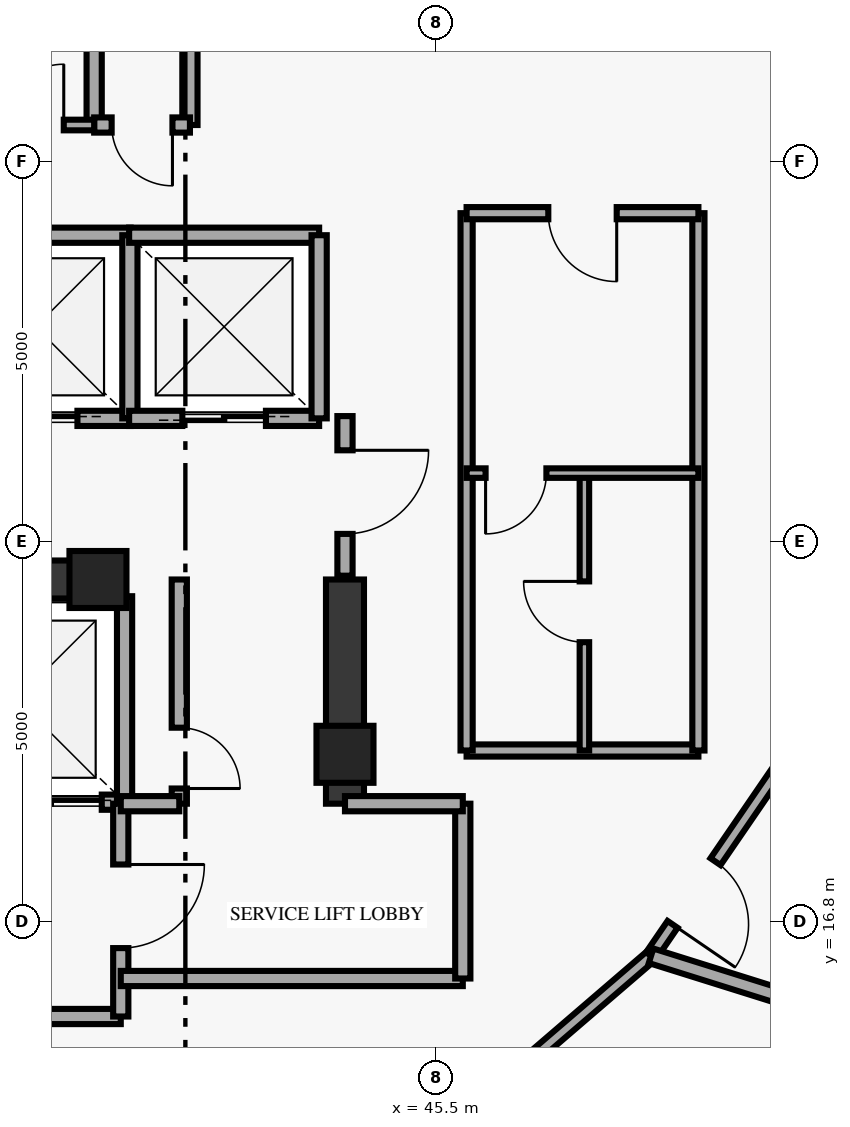
"""IFC4 building model, lengths in metres.
Left out: names, types, materials, properties, quantities, classifications, styles, units other than length and angle.
Written with IfcOpenShell. Run it as: python <this file> out.ifc"""

import sys

from ifc_helpers import new_model, si_unit, direction, frame, frame_2d, origin, origin_2d, place, context, subcontext, project, spatial, rectangle, extrude, element, fill, save


model = new_model("IFC4")
c1 = context("Model", 3, precision=1e-05, world=origin(), true_north=direction((0.0, 1.0)))
c2 = subcontext(c1, "Body", "Model", "MODEL_VIEW")
j1 = project(units=[si_unit("LENGTHUNIT", "METRE"), si_unit("PLANEANGLEUNIT", "RADIAN")], contexts=[c1])
p1 = place(None, origin())
s1 = spatial("IfcSite", under=j1, at=p1, CompositionType="ELEMENT")
p2 = place(p1, origin())
s2 = spatial("IfcBuilding", under=s1, at=p2, CompositionType="ELEMENT")
p3 = place(p2, frame((0.0, 0.0, 297.4)))
s3 = spatial("IfcBuildingStorey", under=s2, at=p3, CompositionType="ELEMENT", Elevation=297.4)
for number, where, z_axis, x_axis in (
    (1, (41.05, 21.3, 0.0), (0.0, 0.0, 1.0), (1.0, 0.0, 0.0)),
    (2, (44.3, 19.0, 0.0), (0.0, 0.0, 1.0), (1.0, 0.0, 0.0)),
):
    element("IfcColumn", number, at=place(p3, frame(where, z_axis=z_axis, x_axis=x_axis)), inside=s3, PredefinedType="PILASTER", context=c2, shape_type="SweptSolid", body=[
        extrude(rectangle(XDim=0.75, YDim=0.75, at=origin_2d()), origin(), (0.0, 0.0, 1.0), 3.45),
    ])
p4 = place(p3, frame((44.3, 18.35, 0.0), z_axis=(0.0, 0.0, 1.0), x_axis=(0.0, 1.0, 0.0)))
e3 = element("IfcWall", 3, at=p4, inside=s3, PredefinedType="SHEAR", context=c2, shape_type="SweptSolid", body=[
    extrude(rectangle(XDim=2.95, YDim=0.5, at=frame_2d((1.475, 0.0))), origin(), (0.0, 0.0, 1.0), 3.45),
])
p5 = place(p3, frame((33.7, 21.3, 0.0), z_axis=(0.0, 0.0, 1.0), x_axis=(1.0, 0.0, 0.0)))
e4 = element("IfcWall", 4, at=p5, inside=s3, PredefinedType="SHEAR", context=c2, shape_type="SweptSolid", body=[
    extrude(rectangle(XDim=7.55, YDim=0.5, at=frame_2d((3.775, 0.0))), origin(), (0.0, 0.0, 1.0), 3.45),
])
for number, where, z_axis, x_axis in (
    (5, (41.0, 27.28, 0.0), (0.0, 0.0, 1.0), (0.0, 1.0, 0.0)),
    (6, (42.26, 27.28, 0.0), (0.0, 0.0, 1.0), (0.0, 1.0, 0.0)),
):
    element("IfcWall", number, at=place(p3, frame(where, z_axis=z_axis, x_axis=x_axis)), inside=s3, PredefinedType="SOLIDWALL", context=c2, shape_type="SweptSolid", body=[
        extrude(rectangle(XDim=1.77, YDim=0.2, at=frame_2d((0.885, 0.0))), origin(), (0.0, 0.0, 1.0), 3.45),
    ])
p6 = place(p3, frame((41.0, 27.28, 0.0), z_axis=(0.0, 0.0, 1.0), x_axis=(1.0, 0.0, 0.0)))
e7 = element("IfcWall", 7, at=p6, inside=s3, PredefinedType="SOLIDWALL", context=c2, shape_type="SweptSolid", body=[
    extrude(rectangle(XDim=1.26, YDim=0.2, at=frame_2d((0.63, 0.0))), origin(), (0.0, 0.0, 1.0), 3.45),
])
p7 = place(p6, frame((0.23, 0.0, 0.0)))
e8 = element("IfcOpeningElement", 8, at=p7, cuts=e7, PredefinedType="OPENING", context=c2, shape_type="SweptSolid", body=[
    extrude(rectangle(XDim=0.8, YDim=2.05, at=frame_2d((0.4, 1.025))), frame((0.0, 0.11, 0.0), z_axis=(0.0, -1.0, 0.0), x_axis=(1.0, 0.0, 0.0)), (0.0, 0.0, 1.0), 0.22),
])
p8 = place(p3, frame((38.98, 23.42, 0.0), z_axis=(0.0, 0.0, 1.0), x_axis=(1.0, 0.0, 0.0)))
e9 = element("IfcWall", 9, at=p8, inside=s3, PredefinedType="SOLIDWALL", context=c2, shape_type="SweptSolid", body=[
    extrude(rectangle(XDim=2.5, YDim=0.2, at=frame_2d((1.25, 0.0))), origin(), (0.0, 0.0, 1.0), 3.45),
])
p9 = place(p8, frame((0.7, 0.0, 0.0)))
e10 = element("IfcOpeningElement", 10, at=p9, cuts=e9, PredefinedType="OPENING", context=c2, shape_type="SweptSolid", body=[
    extrude(rectangle(XDim=1.1, YDim=2.15, at=frame_2d((0.55, 1.075))), frame((0.0, 0.11, 0.0), z_axis=(0.0, -1.0, 0.0), x_axis=(1.0, 0.0, 0.0)), (0.0, 0.0, 1.0), 0.22),
])
p10 = place(p3, frame((38.98, 25.83, 0.0), z_axis=(0.0, 0.0, 1.0), x_axis=(1.0, 0.0, 0.0)))
e11 = element("IfcWall", 11, at=p10, inside=s3, PredefinedType="SOLIDWALL", context=c2, shape_type="SweptSolid", body=[
    extrude(rectangle(XDim=2.5, YDim=0.2, at=frame_2d((1.25, 0.0))), origin(), (0.0, 0.0, 1.0), 3.45),
])
p11 = place(p3, frame((41.47, 23.42, 0.0), z_axis=(0.0, 0.0, 1.0), x_axis=(0.0, 1.0, 0.0)))
e12 = element("IfcWall", 12, at=p11, inside=s3, PredefinedType="SOLIDWALL", context=c2, shape_type="SweptSolid", body=[
    extrude(rectangle(XDim=2.41, YDim=0.2, at=frame_2d((1.205, 0.0))), origin(), (0.0, 0.0, 1.0), 3.45),
])
p12 = place(p3, frame((41.46, 23.42, 0.0), z_axis=(0.0, 0.0, 1.0), x_axis=(1.0, 0.0, 0.0)))
e13 = element("IfcWall", 13, at=p12, inside=s3, PredefinedType="SOLIDWALL", context=c2, shape_type="SweptSolid", body=[
    extrude(rectangle(XDim=2.5, YDim=0.2, at=frame_2d((1.25, 0.0))), origin(), (0.0, 0.0, 1.0), 3.45),
])
p13 = place(p12, frame((0.7, 0.0, 0.0)))
e14 = element("IfcOpeningElement", 14, at=p13, cuts=e13, PredefinedType="OPENING", context=c2, shape_type="SweptSolid", body=[
    extrude(rectangle(XDim=1.1, YDim=2.15, at=frame_2d((0.55, 1.075))), frame((0.0, 0.11, 0.0), z_axis=(0.0, -1.0, 0.0), x_axis=(1.0, 0.0, 0.0)), (0.0, 0.0, 1.0), 0.22),
])
p14 = place(p3, frame((41.46, 25.83, 0.0), z_axis=(0.0, 0.0, 1.0), x_axis=(1.0, 0.0, 0.0)))
e15 = element("IfcWall", 15, at=p14, inside=s3, PredefinedType="SOLIDWALL", context=c2, shape_type="SweptSolid", body=[
    extrude(rectangle(XDim=2.5, YDim=0.2, at=frame_2d((1.25, 0.0))), origin(), (0.0, 0.0, 1.0), 3.45),
])
p15 = place(p3, frame((43.96, 23.42, 0.0), z_axis=(0.0, 0.0, 1.0), x_axis=(0.0, 1.0, 0.0)))
e16 = element("IfcWall", 16, at=p15, inside=s3, PredefinedType="SOLIDWALL", context=c2, shape_type="SweptSolid", body=[
    extrude(rectangle(XDim=2.41, YDim=0.2, at=frame_2d((1.205, 0.0))), origin(), (0.0, 0.0, 1.0), 3.45),
])
p16 = place(p3, frame((38.57, 18.37, 0.0), z_axis=(0.0, 0.0, 1.0), x_axis=(1.0, 0.0, 0.0)))
e17 = element("IfcWall", 17, at=p16, inside=s3, PredefinedType="SOLIDWALL", context=c2, shape_type="SweptSolid", body=[
    extrude(rectangle(XDim=2.83, YDim=0.2, at=frame_2d((1.415, 0.0))), origin(), (0.0, 0.0, 1.0), 3.45),
])
p17 = place(p16, frame((1.18, 0.0, 0.0)))
e18 = element("IfcOpeningElement", 18, at=p17, cuts=e17, PredefinedType="OPENING", context=c2, shape_type="SweptSolid", body=[
    extrude(rectangle(XDim=1.35, YDim=2.18, at=frame_2d((0.675, 1.09))), frame((0.0, 0.11, 0.0), z_axis=(0.0, -1.0, 0.0), x_axis=(1.0, 0.0, 0.0)), (0.0, 0.0, 1.0), 0.22),
])
p18 = place(p3, frame((41.4, 18.37, 0.0), z_axis=(0.0, 0.0, 1.0), x_axis=(0.0, 1.0, 0.0)))
e19 = element("IfcWall", 19, at=p18, inside=s3, PredefinedType="SOLIDWALL", context=c2, shape_type="SweptSolid", body=[
    extrude(rectangle(XDim=2.71, YDim=0.2, at=frame_2d((1.355, 0.0))), origin(), (0.0, 0.0, 1.0), 3.45),
])
p19 = place(p3, frame((45.9, 19.05, 0.0), z_axis=(0.0, 0.0, 1.0), x_axis=(1.0, 0.0, 0.0)))
e20 = element("IfcWall", 20, at=p19, inside=s3, PredefinedType="PARTITIONING", context=c2, shape_type="SweptSolid", body=[
    extrude(rectangle(XDim=3.05, YDim=0.16, at=frame_2d((1.525, 0.0))), origin(), (0.0, 0.0, 1.0), 3.45),
])
for number, where, z_axis, x_axis in (
    (21, (48.95, 19.05, 0.0), (0.0, 0.0, 1.0), (0.0, 1.0, 0.0)),
    (22, (45.9, 19.05, 0.0), (0.0, 0.0, 1.0), (0.0, 1.0, 0.0)),
):
    element("IfcWall", number, at=place(p3, frame(where, z_axis=z_axis, x_axis=x_axis)), inside=s3, PredefinedType="PARTITIONING", context=c2, shape_type="SweptSolid", body=[
        extrude(rectangle(XDim=7.07, YDim=0.16, at=frame_2d((3.535, 0.0))), origin(), (0.0, 0.0, 1.0), 3.45),
    ])
p20 = place(p3, frame((47.45, 22.7, 0.0), z_axis=(0.0, 0.0, 1.0), x_axis=(0.0, -1.0, 0.0)))
e23 = element("IfcWall", 23, at=p20, inside=s3, PredefinedType="PARTITIONING", context=c2, shape_type="SweptSolid", body=[
    extrude(rectangle(XDim=3.65, YDim=0.125, at=frame_2d((1.825, 0.0))), origin(), (0.0, 0.0, 1.0), 3.45),
])
p21 = place(p20, frame((1.425, 0.0, 0.0)))
e24 = element("IfcOpeningElement", 24, at=p21, cuts=e23, PredefinedType="OPENING", context=c2, shape_type="SweptSolid", body=[
    extrude(rectangle(XDim=0.8, YDim=2.05, at=frame_2d((0.4, 1.025))), frame((0.0, 0.073, 0.0), z_axis=(0.0, -1.0, 0.0), x_axis=(1.0, 0.0, 0.0)), (0.0, 0.0, 1.0), 0.145),
])
p22 = place(p3, frame((48.95, 22.7, 0.0), z_axis=(0.0, 0.0, 1.0), x_axis=(-1.0, 0.0, 0.0)))
e25 = element("IfcWall", 25, at=p22, inside=s3, PredefinedType="PARTITIONING", context=c2, shape_type="SweptSolid", body=[
    extrude(rectangle(XDim=3.05, YDim=0.125, at=frame_2d((1.525, 0.0))), origin(), (0.0, 0.0, 1.0), 3.45),
])
p23 = place(p22, frame((2.0, 0.0, 0.0)))
e26 = element("IfcOpeningElement", 26, at=p23, cuts=e25, PredefinedType="OPENING", context=c2, shape_type="SweptSolid", body=[
    extrude(rectangle(XDim=0.8, YDim=2.05, at=frame_2d((0.4, 1.025))), frame((0.0, 0.073, 0.0), z_axis=(0.0, -1.0, 0.0), x_axis=(1.0, 0.0, 0.0)), (0.0, 0.0, 1.0), 0.145),
])
p24 = place(p3, frame((48.95, 26.12, 0.0), z_axis=(0.0, 0.0, 1.0), x_axis=(-1.0, 0.0, 0.0)))
e27 = element("IfcWall", 27, at=p24, inside=s3, PredefinedType="PARTITIONING", context=c2, shape_type="SweptSolid", body=[
    extrude(rectangle(XDim=3.05, YDim=0.16, at=frame_2d((1.525, 0.0))), origin(), (0.0, 0.0, 1.0), 3.45),
])
p25 = place(p24, frame((1.075, 0.0, 0.0)))
e28 = element("IfcOpeningElement", 28, at=p25, cuts=e27, PredefinedType="OPENING", context=c2, shape_type="SweptSolid", body=[
    extrude(rectangle(XDim=0.9, YDim=2.1, at=frame_2d((0.45, 1.05))), frame((0.0, 0.09, 0.0), z_axis=(0.0, -1.0, 0.0), x_axis=(1.0, 0.0, 0.0)), (0.0, 0.0, 1.0), 0.18),
])
p26 = place(p3, frame((44.3, 21.35, 0.0), z_axis=(0.0, 0.0, 1.0), x_axis=(0.0, 1.0, 0.0)))
e29 = element("IfcWall", 29, at=p26, inside=s3, PredefinedType="SOLIDWALL", context=c2, shape_type="SweptSolid", body=[
    extrude(rectangle(XDim=2.1, YDim=0.2, at=frame_2d((1.05, 0.0))), origin(), (0.0, 0.0, 1.0), 2.835),
])
p27 = place(p26, frame((0.55, 0.0, 0.0)))
e30 = element("IfcOpeningElement", 30, at=p27, cuts=e29, PredefinedType="OPENING", context=c2, shape_type="SweptSolid", body=[
    extrude(rectangle(XDim=1.1, YDim=2.15, at=frame_2d((0.55, 1.075))), frame((0.0, 0.11, 0.0), z_axis=(0.0, -1.0, 0.0), x_axis=(1.0, 0.0, 0.0)), (0.0, 0.0, 1.0), 0.22),
])
p28 = place(p3, frame((33.8, 15.55, 0.0), z_axis=(0.0, 0.0, 1.0), x_axis=(1.0, 0.0, 0.0)))
e31 = element("IfcWall", 31, at=p28, inside=s3, PredefinedType="SOLIDWALL", context=c2, shape_type="SweptSolid", body=[
    extrude(rectangle(XDim=7.55, YDim=0.2, at=frame_2d((3.775, 0.0))), origin(), (0.0, 0.0, 1.0), 3.45),
])
p29 = place(p3, frame((41.35, 15.55, 0.0), z_axis=(0.0, 0.0, 1.0), x_axis=(0.0, 1.0, 0.0)))
e32 = element("IfcWall", 32, at=p29, inside=s3, PredefinedType="SOLIDWALL", context=c2, shape_type="SweptSolid", body=[
    extrude(rectangle(XDim=2.8, YDim=0.2, at=frame_2d((1.4, 0.0))), origin(), (0.0, 0.0, 1.0), 3.45),
])
p30 = place(p29, frame((0.9, 0.0, 0.0)))
e33 = element("IfcOpeningElement", 33, at=p30, cuts=e32, PredefinedType="OPENING", context=c2, shape_type="SweptSolid", body=[
    extrude(rectangle(XDim=1.1, YDim=2.15, at=frame_2d((0.55, 1.075))), frame((0.0, 0.11, 0.0), z_axis=(0.0, -1.0, 0.0), x_axis=(1.0, 0.0, 0.0)), (0.0, 0.0, 1.0), 0.22),
])
p31 = place(p3, frame((41.35, 16.05, 0.0), z_axis=(0.0, 0.0, 1.0), x_axis=(1.0, 0.0, 0.0)))
e34 = element("IfcWall", 34, at=p31, inside=s3, PredefinedType="SOLIDWALL", context=c2, shape_type="SweptSolid", body=[
    extrude(rectangle(XDim=4.5, YDim=0.2, at=frame_2d((2.25, 0.0))), origin(), (0.0, 0.0, 1.0), 3.45),
])
p32 = place(p3, frame((45.85, 16.05, 0.0), z_axis=(0.0, 0.0, 1.0), x_axis=(0.0, 1.0, 0.0)))
e35 = element("IfcWall", 35, at=p32, inside=s3, PredefinedType="SOLIDWALL", context=c2, shape_type="SweptSolid", body=[
    extrude(rectangle(XDim=2.3, YDim=0.2, at=frame_2d((1.15, 0.0))), origin(), (0.0, 0.0, 1.0), 3.45),
])
p33 = place(p3, frame((44.3, 18.35, 0.0), z_axis=(0.0, 0.0, 1.0), x_axis=(1.0, 0.0, 0.0)))
e36 = element("IfcWall", 36, at=p33, inside=s3, PredefinedType="SOLIDWALL", context=c2, shape_type="SweptSolid", body=[
    extrude(rectangle(XDim=1.55, YDim=0.2, at=frame_2d((0.775, 0.0))), origin(), (0.0, 0.0, 1.0), 3.45),
])
p34 = place(p3, frame((42.12, 18.35, 0.0), z_axis=(0.0, 0.0, 1.0), x_axis=(0.0, 1.0, 0.0)))
e37 = element("IfcWall", 37, at=p34, inside=s3, PredefinedType="SOLIDWALL", context=c2, shape_type="SweptSolid", body=[
    extrude(rectangle(XDim=2.95, YDim=0.2, at=frame_2d((1.475, 0.0))), origin(), (0.0, 0.0, 1.0), 3.45),
])
p35 = place(p34, frame((0.2, 0.0, 0.0)))
e38 = element("IfcOpeningElement", 38, at=p35, cuts=e37, PredefinedType="OPENING", context=c2, shape_type="SweptSolid", body=[
    extrude(rectangle(XDim=0.8, YDim=2.05, at=frame_2d((0.4, 1.025))), frame((0.0, 0.11, 0.0), z_axis=(0.0, -1.0, 0.0), x_axis=(1.0, 0.0, 0.0)), (0.0, 0.0, 1.0), 0.22),
])
p36 = place(p3, frame((41.35, 18.35, 0.0), z_axis=(0.0, 0.0, 1.0), x_axis=(1.0, 0.0, 0.0)))
e39 = element("IfcWall", 39, at=p36, inside=s3, PredefinedType="SOLIDWALL", context=c2, shape_type="SweptSolid", body=[
    extrude(rectangle(XDim=0.77, YDim=0.2, at=frame_2d((0.385, 0.0))), origin(), (0.0, 0.0, 1.0), 3.45),
])
p37 = place(p3, frame((35.6, 27.28, 0.0), z_axis=(0.0, 0.0, 1.0), x_axis=(1.0, 0.0, 0.0)))
e40 = element("IfcWall", 40, at=p37, inside=s3, PredefinedType="PARTITIONING", context=c2, shape_type="SweptSolid", body=[
    extrude(rectangle(XDim=5.4, YDim=0.14, at=frame_2d((2.7, 0.0))), origin(), (0.0, 0.0, 1.0), 3.45),
])
p38 = place(p37, frame((0.4, 0.0, 0.0)))
e41 = element("IfcOpeningElement", 41, at=p38, cuts=e40, PredefinedType="OPENING", context=c2, shape_type="SweptSolid", body=[
    extrude(rectangle(XDim=0.85, YDim=2.1, at=frame_2d((0.425, 1.05))), frame((0.0, 0.08, 0.0), z_axis=(0.0, -1.0, 0.0), x_axis=(1.0, 0.0, 0.0)), (0.0, 0.0, 1.0), 0.16),
])
p39 = place(p37, frame((2.25, 0.0, 0.0)))
e42 = element("IfcOpeningElement", 42, at=p39, cuts=e40, PredefinedType="OPENING", context=c2, shape_type="SweptSolid", body=[
    extrude(rectangle(XDim=0.95, YDim=2.1, at=frame_2d((0.475, 1.05))), frame((0.0, 0.08, 0.0), z_axis=(0.0, -1.0, 0.0), x_axis=(1.0, 0.0, 0.0)), (0.0, 0.0, 1.0), 0.16),
])
p40 = place(p37, frame((4.2, 0.0, 0.0)))
e43 = element("IfcOpeningElement", 43, at=p40, cuts=e40, PredefinedType="OPENING", context=c2, shape_type="SweptSolid", body=[
    extrude(rectangle(XDim=0.8, YDim=2.05, at=frame_2d((0.4, 1.025))), frame((0.0, 0.08, 0.0), z_axis=(0.0, -1.0, 0.0), x_axis=(1.0, 0.0, 0.0)), (0.0, 0.0, 1.0), 0.16),
])
p41 = place(p3, frame((45.595, 14.0, 0.0), z_axis=(0.0, 0.0, 1.0), x_axis=(0.758232091793, 0.651984735231, 0.0)))
e44 = element("IfcWall", 44, at=p41, inside=s3, PredefinedType="PARTITIONING", context=c2, shape_type="SweptSolid", body=[
    extrude(rectangle(XDim=3.603, YDim=0.16, at=frame_2d((1.802, 0.0))), origin(), (0.0, 0.0, 1.0), 3.45),
])
p42 = place(p3, frame((50.423, 19.41, 0.0), z_axis=(0.0, 0.0, 1.0), x_axis=(-0.565044823329, -0.825060208487, 0.0)))
e45 = element("IfcWall", 45, at=p42, inside=s3, PredefinedType="PARTITIONING", context=c2, shape_type="SweptSolid", body=[
    extrude(rectangle(XDim=3.71, YDim=0.16, at=frame_2d((1.855, 0.0))), origin(), (0.0, 0.0, 1.0), 3.45),
])
p43 = place(p42, frame((2.209, 0.0, 0.0)))
e46 = element("IfcOpeningElement", 46, at=p43, cuts=e45, PredefinedType="OPENING", context=c2, shape_type="SweptSolid", body=[
    extrude(rectangle(XDim=1.0, YDim=2.15, at=frame_2d((0.5, 1.075))), frame((0.0, 0.09, 0.0), z_axis=(0.0, -1.0, 0.0), x_axis=(1.0, 0.0, 0.0)), (0.0, 0.0, 1.0), 0.18),
])
p44 = place(p3, frame((48.327, 16.349, 0.0), z_axis=(0.0, 0.0, 1.0), x_axis=(0.954174696895, -0.299250142532, 0.0)))
e47 = element("IfcWall", 47, at=p44, inside=s3, PredefinedType="PARTITIONING", context=c2, shape_type="SweptSolid", body=[
    extrude(rectangle(XDim=4.846, YDim=0.2, at=frame_2d((2.423, 0.0))), origin(), (0.0, 0.0, 1.0), 3.45),
])
p45 = place(p7, origin())
e48 = element("IfcDoor", 48, at=p45, inside=s3, OperationType="SINGLE_SWING_RIGHT", PredefinedType="DOOR", context=c2, shape_type="SweptSolid", body=[
    extrude(rectangle(XDim=0.8, YDim=2.05, at=frame_2d((0.4, 1.025))), frame((0.0, 0.025, 0.0), z_axis=(0.0, -1.0, 0.0), x_axis=(1.0, 0.0, 0.0)), (0.0, 0.0, 1.0), 0.05),
])
fill(e8, e48)
p46 = place(p9, origin())
e49 = element("IfcDoor", 49, at=p46, inside=s3, OperationType="DOUBLE_DOOR_SLIDING", PredefinedType="DOOR", context=c2, shape_type="SweptSolid", body=[
    extrude(rectangle(XDim=1.1, YDim=2.15, at=frame_2d((0.55, 1.075))), frame((0.0, 0.025, 0.0), z_axis=(0.0, -1.0, 0.0), x_axis=(1.0, 0.0, 0.0)), (0.0, 0.0, 1.0), 0.05),
])
fill(e10, e49)
p47 = place(p13, origin())
e50 = element("IfcDoor", 50, at=p47, inside=s3, OperationType="DOUBLE_DOOR_SLIDING", PredefinedType="DOOR", context=c2, shape_type="SweptSolid", body=[
    extrude(rectangle(XDim=1.1, YDim=2.15, at=frame_2d((0.55, 1.075))), frame((0.0, 0.025, 0.0), z_axis=(0.0, -1.0, 0.0), x_axis=(1.0, 0.0, 0.0)), (0.0, 0.0, 1.0), 0.05),
])
fill(e14, e50)
p48 = place(p17, origin())
e51 = element("IfcDoor", 51, at=p48, inside=s3, OperationType="DOUBLE_DOOR_SLIDING", PredefinedType="DOOR", context=c2, shape_type="SweptSolid", body=[
    extrude(rectangle(XDim=1.35, YDim=2.18, at=frame_2d((0.675, 1.09))), frame((0.0, 0.025, 0.0), z_axis=(0.0, -1.0, 0.0), x_axis=(1.0, 0.0, 0.0)), (0.0, 0.0, 1.0), 0.05),
])
fill(e18, e51)
p49 = place(p21, origin())
e52 = element("IfcDoor", 52, at=p49, inside=s3, OperationType="SINGLE_SWING_LEFT", PredefinedType="DOOR", context=c2, shape_type="SweptSolid", body=[
    extrude(rectangle(XDim=0.8, YDim=2.05, at=frame_2d((0.4, 1.025))), frame((0.0, 0.025, 0.0), z_axis=(0.0, -1.0, 0.0), x_axis=(1.0, 0.0, 0.0)), (0.0, 0.0, 1.0), 0.05),
])
fill(e24, e52)
p50 = place(p23, origin())
e53 = element("IfcDoor", 53, at=p50, inside=s3, OperationType="SINGLE_SWING_RIGHT", PredefinedType="DOOR", context=c2, shape_type="SweptSolid", body=[
    extrude(rectangle(XDim=0.8, YDim=2.05, at=frame_2d((0.4, 1.025))), frame((0.0, 0.025, 0.0), z_axis=(0.0, -1.0, 0.0), x_axis=(1.0, 0.0, 0.0)), (0.0, 0.0, 1.0), 0.05),
])
fill(e26, e53)
p51 = place(p25, origin())
e54 = element("IfcDoor", 54, at=p51, inside=s3, OperationType="SINGLE_SWING_LEFT", PredefinedType="DOOR", context=c2, shape_type="SweptSolid", body=[
    extrude(rectangle(XDim=0.9, YDim=2.1, at=frame_2d((0.45, 1.05))), frame((0.0, 0.025, 0.0), z_axis=(0.0, -1.0, 0.0), x_axis=(1.0, 0.0, 0.0)), (0.0, 0.0, 1.0), 0.05),
])
fill(e28, e54)
p52 = place(p27, origin())
e55 = element("IfcDoor", 55, at=p52, inside=s3, OperationType="SINGLE_SWING_RIGHT", PredefinedType="DOOR", context=c2, shape_type="SweptSolid", body=[
    extrude(rectangle(XDim=1.1, YDim=2.15, at=frame_2d((0.55, 1.075))), frame((0.0, 0.025, 0.0), z_axis=(0.0, -1.0, 0.0), x_axis=(1.0, 0.0, 0.0)), (0.0, 0.0, 1.0), 0.05),
])
fill(e30, e55)
p53 = place(p30, origin())
e56 = element("IfcDoor", 56, at=p53, inside=s3, OperationType="SINGLE_SWING_RIGHT", PredefinedType="DOOR", context=c2, shape_type="SweptSolid", body=[
    extrude(rectangle(XDim=1.1, YDim=2.15, at=frame_2d((0.55, 1.075))), frame((0.0, 0.025, 0.0), z_axis=(0.0, -1.0, 0.0), x_axis=(1.0, 0.0, 0.0)), (0.0, 0.0, 1.0), 0.05),
])
fill(e33, e56)
p54 = place(p35, origin())
e57 = element("IfcDoor", 57, at=p54, inside=s3, OperationType="SINGLE_SWING_LEFT", PredefinedType="DOOR", context=c2, shape_type="SweptSolid", body=[
    extrude(rectangle(XDim=0.8, YDim=2.05, at=frame_2d((0.4, 1.025))), frame((0.0, 0.025, 0.0), z_axis=(0.0, -1.0, 0.0), x_axis=(1.0, 0.0, 0.0)), (0.0, 0.0, 1.0), 0.05),
])
fill(e38, e57)
p55 = place(p40, origin())
e58 = element("IfcDoor", 58, at=p55, inside=s3, OperationType="SINGLE_SWING_RIGHT", PredefinedType="DOOR", context=c2, shape_type="SweptSolid", body=[
    extrude(rectangle(XDim=0.8, YDim=2.05, at=frame_2d((0.4, 1.025))), frame((0.0, 0.025, 0.0), z_axis=(0.0, -1.0, 0.0), x_axis=(1.0, 0.0, 0.0)), (0.0, 0.0, 1.0), 0.05),
])
fill(e43, e58)
p56 = place(p43, origin())
e59 = element("IfcDoor", 59, at=p56, inside=s3, OperationType="SINGLE_SWING_RIGHT", PredefinedType="DOOR", context=c2, shape_type="SweptSolid", body=[
    extrude(rectangle(XDim=1.0, YDim=2.15, at=frame_2d((0.5, 1.075))), frame((0.0, 0.025, 0.0), z_axis=(0.0, -1.0, 0.0), x_axis=(1.0, 0.0, 0.0)), (0.0, 0.0, 1.0), 0.05),
])
fill(e46, e59)
save(model, sys.argv[1])
